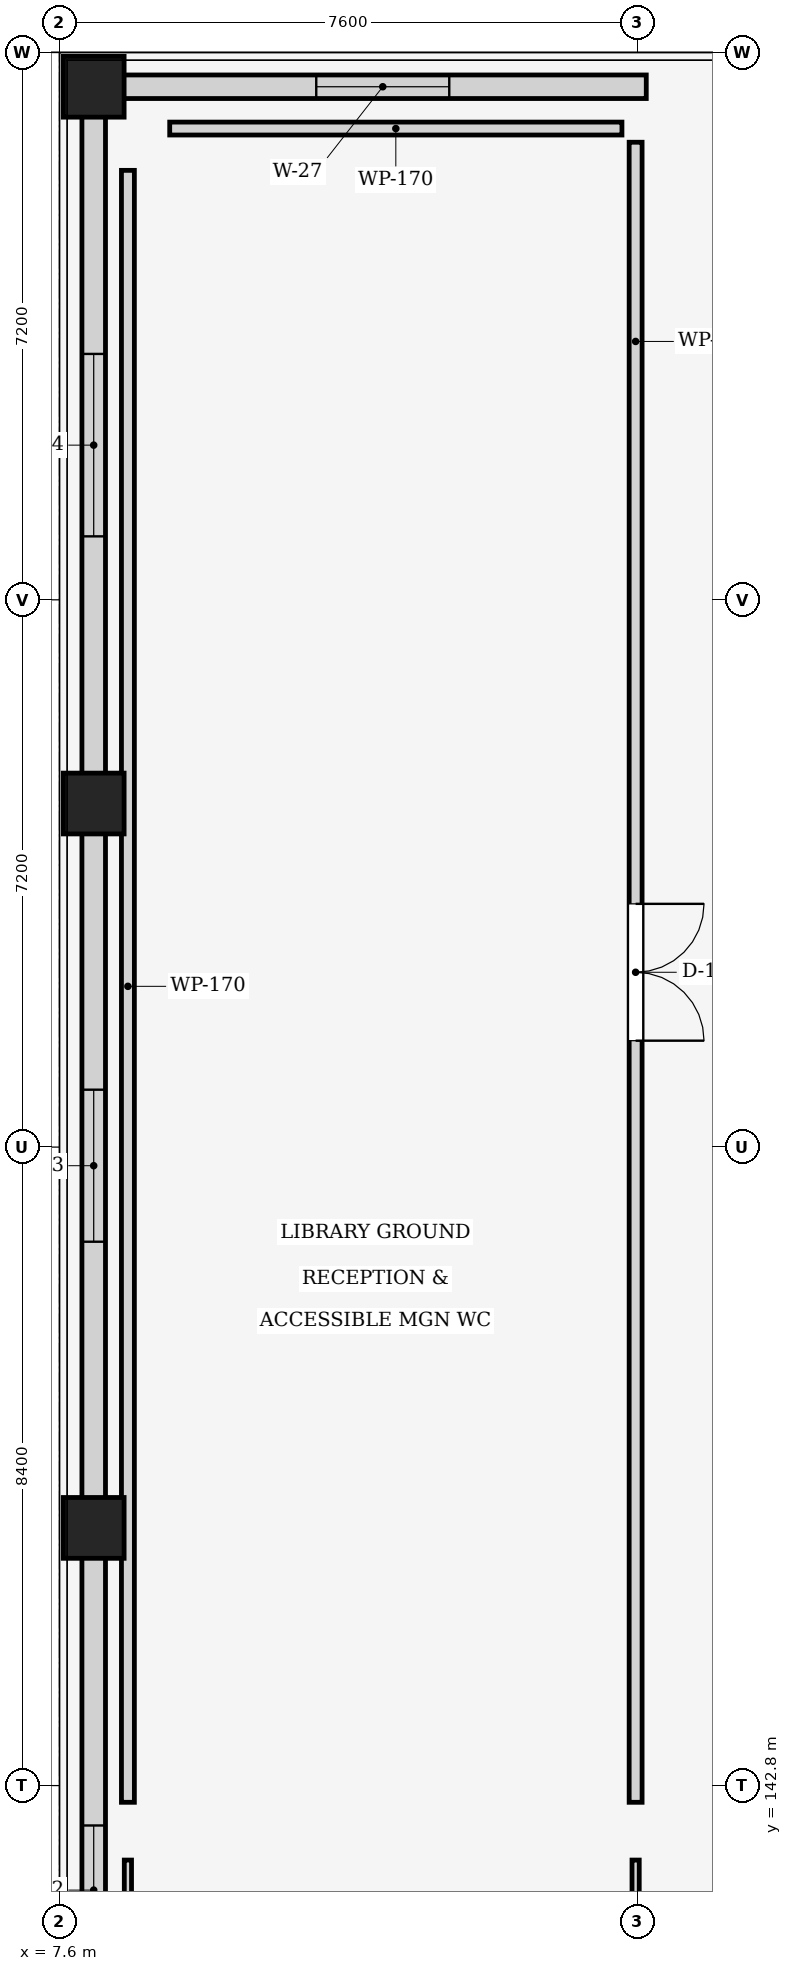
"""IFC4 building model, lengths in metres.
Left out: names, types, materials, properties, quantities, classifications, styles, units other than length and angle.
Written with IfcOpenShell. Run it as: python <this file> out.ifc"""

import sys

from ifc_helpers import new_model, si_unit, direction, frame, frame_2d, origin, origin_2d, place, context, subcontext, project, spatial, rectangle, extrude, element, fill, save


model = new_model("IFC4")
c1 = context("Model", 3, precision=1e-05, world=origin(), true_north=direction((0.0, 1.0)))
c2 = subcontext(c1, "Body", "Model", "MODEL_VIEW")
j1 = project(units=[si_unit("LENGTHUNIT", "METRE"), si_unit("PLANEANGLEUNIT", "RADIAN")], contexts=[c1])
p1 = place(None, origin())
s1 = spatial("IfcSite", under=j1, at=p1, CompositionType="ELEMENT")
p2 = place(p1, origin())
s2 = spatial("IfcBuilding", under=s1, at=p2, CompositionType="ELEMENT")
p3 = place(p2, origin())
s3 = spatial("IfcBuildingStorey", under=s2, at=p3, CompositionType="ELEMENT", Elevation=0.0)
for number, where, z_axis, x_axis in (
    (1, (8.05, 146.19, 0.0), (0.0, 0.0, 1.0), (1.0, 0.0, 0.0)),
    (2, (8.05, 155.72, 0.0), (0.0, 0.0, 1.0), (1.0, 0.0, 0.0)),
    (3, (8.05, 165.15, 0.0), (0.0, 0.0, 1.0), (1.0, 0.0, 0.0)),
):
    element("IfcColumn", number, at=place(p3, frame(where, z_axis=z_axis, x_axis=x_axis)), inside=s3, PredefinedType="COLUMN", context=c2, shape_type="SweptSolid", body=[
        extrude(rectangle(XDim=0.8, YDim=0.8, at=origin_2d()), origin(), (0.0, 0.0, 1.0), 5.1),
    ])
p4 = place(p3, frame((8.385, 165.15, 0.0), z_axis=(0.0, 0.0, 1.0), x_axis=(1.0, 0.0, 0.0)))
e4 = element("IfcWall", 4, at=p4, inside=s3, PredefinedType="STANDARD", context=c2, shape_type="SweptSolid", body=[
    extrude(rectangle(XDim=6.935, YDim=0.31, at=frame_2d((3.468, 0.0))), origin(), (0.0, 0.0, 1.0), 4.045),
])
p5 = place(p4, frame((2.593, 0.0, 0.85)))
e5 = element("IfcOpeningElement", 5, at=p5, cuts=e4, PredefinedType="OPENING", context=c2, shape_type="SweptSolid", body=[
    extrude(rectangle(XDim=1.75, YDim=1.85, at=frame_2d((0.875, 0.925))), frame((0.0, 0.165, 0.0), z_axis=(0.0, -1.0, 0.0), x_axis=(1.0, 0.0, 0.0)), (0.0, 0.0, 1.0), 0.33),
])
p6 = place(p3, frame((8.05, 136.995, 0.0), z_axis=(0.0, 0.0, 1.0), x_axis=(0.0, 1.0, 0.0)))
e6 = element("IfcWall", 6, at=p6, inside=s3, PredefinedType="STANDARD", context=c2, shape_type="SweptSolid", body=[
    extrude(rectangle(XDim=8.86, YDim=0.31, at=frame_2d((4.43, 0.0))), origin(), (0.0, 0.0, 1.0), 4.195),
])
p7 = place(p6, frame((3.58, 0.0, 0.85)))
e7 = element("IfcOpeningElement", 7, at=p7, cuts=e6, PredefinedType="OPENING", context=c2, shape_type="SweptSolid", body=[
    extrude(rectangle(XDim=1.7, YDim=2.05, at=frame_2d((0.85, 1.025))), frame((0.0, 0.165, 0.0), z_axis=(0.0, -1.0, 0.0), x_axis=(1.0, 0.0, 0.0)), (0.0, 0.0, 1.0), 0.33),
])
p8 = place(p3, frame((8.05, 146.525, 0.0), z_axis=(0.0, 0.0, 1.0), x_axis=(0.0, 1.0, 0.0)))
e8 = element("IfcWall", 8, at=p8, inside=s3, PredefinedType="STANDARD", context=c2, shape_type="SweptSolid", body=[
    extrude(rectangle(XDim=8.86, YDim=0.31, at=frame_2d((4.43, 0.0))), origin(), (0.0, 0.0, 1.0), 4.195),
])
p9 = place(p8, frame((3.43, 0.0, 0.85)))
e9 = element("IfcOpeningElement", 9, at=p9, cuts=e8, PredefinedType="OPENING", context=c2, shape_type="SweptSolid", body=[
    extrude(rectangle(XDim=2.0, YDim=2.05, at=frame_2d((1.0, 1.025))), frame((0.0, 0.165, 0.0), z_axis=(0.0, -1.0, 0.0), x_axis=(1.0, 0.0, 0.0)), (0.0, 0.0, 1.0), 0.33),
])
p10 = place(p3, frame((8.05, 156.055, 0.0), z_axis=(0.0, 0.0, 1.0), x_axis=(0.0, 1.0, 0.0)))
e10 = element("IfcWall", 10, at=p10, inside=s3, PredefinedType="STANDARD", context=c2, shape_type="SweptSolid", body=[
    extrude(rectangle(XDim=8.76, YDim=0.31, at=frame_2d((4.38, 0.0))), origin(), (0.0, 0.0, 1.0), 4.195),
])
p11 = place(p10, frame((3.18, 0.0, 0.85)))
e11 = element("IfcOpeningElement", 11, at=p11, cuts=e10, PredefinedType="OPENING", context=c2, shape_type="SweptSolid", body=[
    extrude(rectangle(XDim=2.4, YDim=2.05, at=frame_2d((1.2, 1.025))), frame((0.0, 0.165, 0.0), z_axis=(0.0, -1.0, 0.0), x_axis=(1.0, 0.0, 0.0)), (0.0, 0.0, 1.0), 0.33),
])
p12 = place(p3, frame((15.18, 141.82, 0.0), z_axis=(0.0, 0.0, 1.0), x_axis=(0.0, -1.0, 0.0)))
e12 = element("IfcWall", 12, at=p12, inside=s3, PredefinedType="PARTITIONING", context=c2, shape_type="SweptSolid", body=[
    extrude(rectangle(XDim=23.44, YDim=0.095, at=frame_2d((11.72, 0.0))), origin(), (0.0, 0.0, 1.0), 4.045),
])
p13 = place(p12, frame((10.92, 0.0, 0.0)))
e13 = element("IfcOpeningElement", 13, at=p13, cuts=e12, PredefinedType="OPENING", context=c2, shape_type="SweptSolid", body=[
    extrude(rectangle(XDim=1.6, YDim=2.22, at=frame_2d((0.8, 1.11))), frame((0.0, 0.057, 0.0), z_axis=(0.0, -1.0, 0.0), x_axis=(1.0, 0.0, 0.0)), (0.0, 0.0, 1.0), 0.115),
])
p14 = place(p3, frame((8.5, 118.75, 0.0), z_axis=(0.0, 0.0, 1.0), x_axis=(0.0, 1.0, 0.0)))
e14 = element("IfcWall", 14, at=p14, inside=s3, PredefinedType="PARTITIONING", context=c2, shape_type="SweptSolid", body=[
    extrude(rectangle(XDim=23.07, YDim=0.095, at=frame_2d((11.535, 0.0))), origin(), (0.0, 0.0, 1.0), 4.045),
])
p15 = place(p3, frame((15.18, 164.42, 0.0), z_axis=(0.0, 0.0, 1.0), x_axis=(0.0, -1.0, 0.0)))
e15 = element("IfcWall", 15, at=p15, inside=s3, PredefinedType="PARTITIONING", context=c2, shape_type="SweptSolid", body=[
    extrude(rectangle(XDim=21.84, YDim=0.17, at=frame_2d((10.92, 0.0))), origin(), (0.0, 0.0, 1.0), 4.045),
])
p16 = place(p15, frame((10.02, 0.0, 0.0)))
e16 = element("IfcOpeningElement", 16, at=p16, cuts=e15, PredefinedType="OPENING", context=c2, shape_type="SweptSolid", body=[
    extrude(rectangle(XDim=1.8, YDim=2.22, at=frame_2d((0.9, 1.11))), frame((0.0, 0.095, 0.0), z_axis=(0.0, -1.0, 0.0), x_axis=(1.0, 0.0, 0.0)), (0.0, 0.0, 1.0), 0.19),
])
p17 = place(p3, frame((8.5, 142.58, 0.0), z_axis=(0.0, 0.0, 1.0), x_axis=(0.0, 1.0, 0.0)))
e17 = element("IfcWall", 17, at=p17, inside=s3, PredefinedType="PARTITIONING", context=c2, shape_type="SweptSolid", body=[
    extrude(rectangle(XDim=21.47, YDim=0.17, at=frame_2d((10.735, 0.0))), origin(), (0.0, 0.0, 1.0), 4.045),
])
p18 = place(p3, frame((9.05, 164.6, 0.0), z_axis=(0.0, 0.0, 1.0), x_axis=(1.0, 0.0, 0.0)))
e18 = element("IfcWall", 18, at=p18, inside=s3, PredefinedType="PARTITIONING", context=c2, shape_type="SweptSolid", body=[
    extrude(rectangle(XDim=5.95, YDim=0.17, at=frame_2d((2.975, 0.0))), origin(), (0.0, 0.0, 1.0), 4.73),
])
p19 = place(p5, origin())
e19 = element("IfcWindow", 19, at=p19, inside=s3, PartitioningType="SINGLE_PANEL", PredefinedType="WINDOW", context=c2, shape_type="SweptSolid", body=[
    extrude(rectangle(XDim=1.75, YDim=1.85, at=frame_2d((0.875, 0.925))), frame((0.0, 0.03, 0.0), z_axis=(0.0, -1.0, 0.0), x_axis=(1.0, 0.0, 0.0)), (0.0, 0.0, 1.0), 0.06),
])
fill(e5, e19)
p20 = place(p7, origin())
e20 = element("IfcWindow", 20, at=p20, inside=s3, PartitioningType="SINGLE_PANEL", PredefinedType="WINDOW", context=c2, shape_type="SweptSolid", body=[
    extrude(rectangle(XDim=1.7, YDim=2.05, at=frame_2d((0.85, 1.025))), frame((0.0, 0.03, 0.0), z_axis=(0.0, -1.0, 0.0), x_axis=(1.0, 0.0, 0.0)), (0.0, 0.0, 1.0), 0.06),
])
fill(e7, e20)
p21 = place(p9, origin())
e21 = element("IfcWindow", 21, at=p21, inside=s3, PartitioningType="SINGLE_PANEL", PredefinedType="WINDOW", context=c2, shape_type="SweptSolid", body=[
    extrude(rectangle(XDim=2.0, YDim=2.05, at=frame_2d((1.0, 1.025))), frame((0.0, 0.03, 0.0), z_axis=(0.0, -1.0, 0.0), x_axis=(1.0, 0.0, 0.0)), (0.0, 0.0, 1.0), 0.06),
])
fill(e9, e21)
p22 = place(p11, origin())
e22 = element("IfcWindow", 22, at=p22, inside=s3, PartitioningType="SINGLE_PANEL", PredefinedType="WINDOW", context=c2, shape_type="SweptSolid", body=[
    extrude(rectangle(XDim=2.4, YDim=2.05, at=frame_2d((1.2, 1.025))), frame((0.0, 0.03, 0.0), z_axis=(0.0, -1.0, 0.0), x_axis=(1.0, 0.0, 0.0)), (0.0, 0.0, 1.0), 0.06),
])
fill(e11, e22)
p23 = place(p16, origin())
e23 = element("IfcDoor", 23, at=p23, inside=s3, OperationType="DOUBLE_DOOR_SINGLE_SWING", PredefinedType="DOOR", context=c2, shape_type="SweptSolid", body=[
    extrude(rectangle(XDim=1.8, YDim=2.22, at=frame_2d((0.9, 1.11))), frame((0.0, 0.025, 0.0), z_axis=(0.0, -1.0, 0.0), x_axis=(1.0, 0.0, 0.0)), (0.0, 0.0, 1.0), 0.05),
])
fill(e16, e23)
save(model, sys.argv[1])
